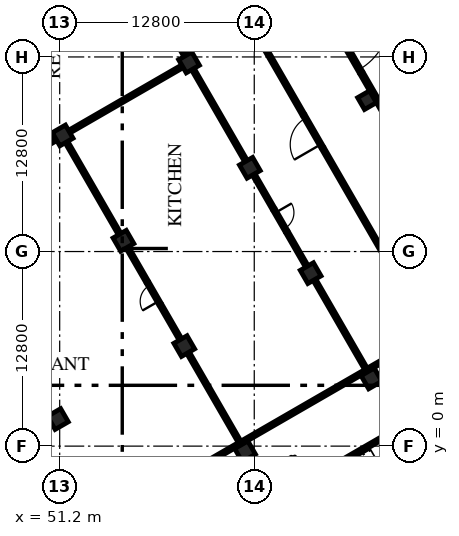
"""IFC4 building model, lengths in metres.
Left out: names, types, materials, properties, quantities, classifications, styles, units other than length and angle.
Written with IfcOpenShell. Run it as: python <this file> out.ifc"""

import sys

from ifc_helpers import new_model, si_unit, direction, frame, frame_2d, origin, origin_2d, place, context, subcontext, project, spatial, rectangle, extrude, element, fill, save


model = new_model("IFC4")
c1 = context("Model", 3, precision=1e-05, world=origin(), true_north=direction((0.0, 1.0)))
c2 = subcontext(c1, "Body", "Model", "MODEL_VIEW")
j1 = project(units=[si_unit("LENGTHUNIT", "METRE"), si_unit("PLANEANGLEUNIT", "RADIAN")], contexts=[c1])
p1 = place(None, origin())
s1 = spatial("IfcSite", under=j1, at=p1, CompositionType="ELEMENT")
p2 = place(p1, origin())
s2 = spatial("IfcBuilding", under=s1, at=p2, CompositionType="ELEMENT")
p3 = place(p2, origin())
s3 = spatial("IfcBuildingStorey", under=s2, at=p3, CompositionType="ELEMENT", Elevation=0.0)
for number, where, z_axis, x_axis in (
    (1, (63.396, -0.349, -0.3), (0.0, 0.0, 1.0), (-0.5, 0.866, 0.0)),
    (2, (71.71, 4.451, -0.3), (0.0, 0.0, 1.0), (-0.5, 0.866, 0.0)),
    (3, (51.082, 1.779, -0.3), (0.0, 0.0, 1.0), (-0.5, 0.866, 0.0)),
    (4, (59.396, 6.579, -0.3), (0.0, 0.0, 1.0), (-0.5, 0.866, 0.0)),
    (5, (67.71, 11.379, -0.3), (0.0, 0.0, 1.0), (-0.5, 0.866, 0.0)),
    (6, (55.396, 13.508, -0.3), (0.0, 0.0, 1.0), (-0.5, 0.866, 0.0)),
    (7, (63.71, 18.308, -0.3), (0.0, 0.0, 1.0), (-0.5, 0.866, 0.0)),
):
    element("IfcColumn", number, at=place(p3, frame(where, z_axis=z_axis, x_axis=x_axis)), inside=s3, PredefinedType="COLUMN", context=c2, shape_type="SweptSolid", body=[
        extrude(rectangle(XDim=1.0, YDim=1.0, at=origin_2d()), origin(), (0.0, 0.0, 1.0), 6.3),
    ])
p4 = place(p3, frame((71.417, 22.758, -0.3), z_axis=(0.0, 0.0, 1.0), x_axis=(-0.5, 0.866025403784, 0.0)))
e8 = element("IfcColumn", 8, at=p4, inside=s3, PredefinedType="COLUMN", context=c2, shape_type="SweptSolid", body=[
    extrude(rectangle(XDim=0.9, YDim=0.9, at=origin_2d()), origin(), (0.0, 0.0, 1.0), 6.3),
])
for number, where, z_axis, x_axis in (
    (9, (51.396, 20.436, -0.3), (0.0, 0.0, 1.0), (-0.5, 0.866, 0.0)),
    (10, (59.71, 25.236, -0.3), (0.0, 0.0, 1.0), (-0.5, 0.866, 0.0)),
):
    element("IfcColumn", number, at=place(p3, frame(where, z_axis=z_axis, x_axis=x_axis)), inside=s3, PredefinedType="COLUMN", context=c2, shape_type="SweptSolid", body=[
        extrude(rectangle(XDim=1.0, YDim=1.0, at=origin_2d()), origin(), (0.0, 0.0, 1.0), 6.3),
    ])
p5 = place(p3, frame((71.04, 24.561, 0.0), z_axis=(0.0, 0.0, 1.0), x_axis=(0.499980071345, -0.866036909293, 0.0)))
e11 = element("IfcWall", 11, at=p5, inside=s3, PredefinedType="SOLIDWALL", context=c2, shape_type="SweptSolid", body=[
    extrude(rectangle(XDim=3.5, YDim=0.25, at=frame_2d((1.75, 0.0))), origin(), (0.0, 0.0, 1.0), 5.7),
])
p6 = place(p3, frame((68.79, 28.458, 0.0), z_axis=(0.0, 0.0, 1.0), x_axis=(0.500013631625, -0.866017533419, 0.0)))
e12 = element("IfcWall", 12, at=p6, inside=s3, PredefinedType="SOLIDWALL", context=c2, shape_type="SweptSolid", body=[
    extrude(rectangle(XDim=4.5, YDim=0.25, at=frame_2d((2.25, 0.0))), origin(), (0.0, 0.0, 1.0), 5.7),
])
p7 = place(p6, frame((0.25, 0.0, 0.0)))
e13 = element("IfcOpeningElement", 13, at=p7, cuts=e12, PredefinedType="OPENING", context=c2, shape_type="SweptSolid", body=[
    extrude(rectangle(XDim=4.0, YDim=4.0, at=frame_2d((2.0, 2.0))), frame((0.0, 0.135, 0.0), z_axis=(0.0, -1.0, 0.0), x_axis=(1.0, 0.0, 0.0)), (0.0, 0.0, 1.0), 0.27),
])
p8 = place(p3, frame((67.349, -2.396, 0.0), z_axis=(0.0, 0.0, 1.0), x_axis=(0.86601134256, 0.500024353964, 0.0)))
e14 = element("IfcWall", 14, at=p8, inside=s3, PredefinedType="SOLIDWALL", context=c2, shape_type="SweptSolid", body=[
    extrude(rectangle(XDim=6.65, YDim=0.2, at=frame_2d((3.325, 0.0))), origin(), (0.0, 0.0, 1.0), 5.7),
])
p9 = place(p3, frame((63.083, 0.192, 0.0), z_axis=(0.0, 0.0, 1.0), x_axis=(-0.499988857673, 0.866031836714, 0.0)))
e15 = element("IfcWall", 15, at=p9, inside=s3, PredefinedType="PARTITIONING", context=c2, shape_type="SweptSolid", body=[
    extrude(rectangle(XDim=6.875, YDim=0.2, at=frame_2d((3.438, 0.0))), origin(), (0.0, 0.0, 1.0), 5.1),
])
p10 = place(p3, frame((59.146, 7.012, 0.0), z_axis=(0.0, 0.0, 1.0), x_axis=(-0.499993606316, 0.866029095148, 0.0)))
e16 = element("IfcWall", 16, at=p10, inside=s3, PredefinedType="PARTITIONING", context=c2, shape_type="SweptSolid", body=[
    extrude(rectangle(XDim=2.65, YDim=0.2, at=frame_2d((1.325, 0.0))), origin(), (0.0, 0.0, 1.0), 5.1),
])
p11 = place(p3, frame((57.821, 9.307, 0.0), z_axis=(0.0, 0.0, 1.0), x_axis=(-0.500062241894, 0.865989465428, 0.0)))
e17 = element("IfcWall", 17, at=p11, inside=s3, PredefinedType="PARTITIONING", context=c2, shape_type="SweptSolid", body=[
    extrude(rectangle(XDim=1.7, YDim=0.2, at=frame_2d((0.85, 0.0))), origin(), (0.0, 0.0, 1.0), 5.1),
])
p12 = place(p11, frame((0.25, 0.0, 0.0)))
e18 = element("IfcOpeningElement", 18, at=p12, cuts=e17, PredefinedType="OPENING", context=c2, shape_type="SweptSolid", body=[
    extrude(rectangle(XDim=1.2, YDim=2.1, at=frame_2d((0.6, 1.05))), frame((0.0, 0.11, 0.0), z_axis=(0.0, -1.0, 0.0), x_axis=(1.0, 0.0, 0.0)), (0.0, 0.0, 1.0), 0.22),
])
p13 = place(p3, frame((56.971, 10.78, 0.0), z_axis=(0.0, 0.0, 1.0), x_axis=(-0.499953715521, 0.866052124492, 0.0)))
e19 = element("IfcWall", 19, at=p13, inside=s3, PredefinedType="PARTITIONING", context=c2, shape_type="SweptSolid", body=[
    extrude(rectangle(XDim=2.65, YDim=0.2, at=frame_2d((1.325, 0.0))), origin(), (0.0, 0.0, 1.0), 5.1),
])
p14 = place(p3, frame((55.146, 13.941, 0.0), z_axis=(0.0, 0.0, 1.0), x_axis=(-0.500010275428, 0.866019471182, 0.0)))
e20 = element("IfcWall", 20, at=p14, inside=s3, PredefinedType="PARTITIONING", context=c2, shape_type="SweptSolid", body=[
    extrude(rectangle(XDim=7.0, YDim=0.2, at=frame_2d((3.5, 0.0))), origin(), (0.0, 0.0, 1.0), 5.1),
])
p15 = place(p3, frame((71.397, 4.992, 0.0), z_axis=(0.0, 0.0, 1.0), x_axis=(-0.500004234368, 0.866022959057, 0.0)))
e21 = element("IfcWall", 21, at=p15, inside=s3, PredefinedType="PARTITIONING", context=c2, shape_type="SweptSolid", body=[
    extrude(rectangle(XDim=6.875, YDim=0.2, at=frame_2d((3.438, 0.0))), origin(), (0.0, 0.0, 1.0), 5.1),
])
p16 = place(p3, frame((67.46, 11.812, 0.0), z_axis=(0.0, 0.0, 1.0), x_axis=(-0.499993606316, 0.866029095148, 0.0)))
e22 = element("IfcWall", 22, at=p16, inside=s3, PredefinedType="PARTITIONING", context=c2, shape_type="SweptSolid", body=[
    extrude(rectangle(XDim=2.65, YDim=0.2, at=frame_2d((1.325, 0.0))), origin(), (0.0, 0.0, 1.0), 5.1),
])
p17 = place(p3, frame((65.285, 15.58, 0.0), z_axis=(0.0, 0.0, 1.0), x_axis=(0.500062241894, -0.865989465428, 0.0)))
e23 = element("IfcWall", 23, at=p17, inside=s3, PredefinedType="PARTITIONING", context=c2, shape_type="SweptSolid", body=[
    extrude(rectangle(XDim=1.7, YDim=0.2, at=frame_2d((0.85, 0.0))), origin(), (0.0, 0.0, 1.0), 5.1),
])
p18 = place(p17, frame((0.25, 0.0, 0.0)))
e24 = element("IfcOpeningElement", 24, at=p18, cuts=e23, PredefinedType="OPENING", context=c2, shape_type="SweptSolid", body=[
    extrude(rectangle(XDim=1.2, YDim=2.1, at=frame_2d((0.6, 1.05))), frame((0.0, 0.11, 0.0), z_axis=(0.0, -1.0, 0.0), x_axis=(1.0, 0.0, 0.0)), (0.0, 0.0, 1.0), 0.22),
])
p19 = place(p3, frame((65.285, 15.58, 0.0), z_axis=(0.0, 0.0, 1.0), x_axis=(-0.499993606316, 0.866029095148, 0.0)))
e25 = element("IfcWall", 25, at=p19, inside=s3, PredefinedType="PARTITIONING", context=c2, shape_type="SweptSolid", body=[
    extrude(rectangle(XDim=2.65, YDim=0.2, at=frame_2d((1.325, 0.0))), origin(), (0.0, 0.0, 1.0), 5.1),
])
for number, where, z_axis, x_axis in (
    (26, (63.46, 18.74, 0.0), (0.0, 0.0, 1.0), (-0.5, 0.866, 0.0)),
    (27, (59.46, 25.669, 0.0), (0.0, 0.0, 1.0), (-0.5, 0.866, 0.0)),
):
    element("IfcWall", number, at=place(p3, frame(where, z_axis=z_axis, x_axis=x_axis)), inside=s3, PredefinedType="PARTITIONING", context=c2, shape_type="SweptSolid", body=[
        extrude(rectangle(XDim=7.0, YDim=0.2, at=frame_2d((3.5, 0.0))), origin(), (0.0, 0.0, 1.0), 5.1),
    ])
p20 = place(p3, frame((75.554, 7.393, 0.0), z_axis=(0.0, 0.0, 1.0), x_axis=(-0.500005731256, 0.866022094817, 0.0)))
e28 = element("IfcWall", 28, at=p20, inside=s3, PredefinedType="PARTITIONING", context=c2, shape_type="SweptSolid", body=[
    extrude(rectangle(XDim=14.125, YDim=0.2, at=frame_2d((7.062, 0.0))), origin(), (0.0, 0.0, 1.0), 5.1),
])
p21 = place(p3, frame((68.492, 19.625, 0.0), z_axis=(0.0, 0.0, 1.0), x_axis=(-0.500004234368, 0.866022959057, 0.0)))
e29 = element("IfcWall", 29, at=p21, inside=s3, PredefinedType="PARTITIONING", context=c2, shape_type="SweptSolid", body=[
    extrude(rectangle(XDim=2.5, YDim=0.2, at=frame_2d((1.25, 0.0))), origin(), (0.0, 0.0, 1.0), 5.1),
])
p22 = place(p21, frame((0.25, 0.0, 0.0)))
e30 = element("IfcOpeningElement", 30, at=p22, cuts=e29, PredefinedType="OPENING", context=c2, shape_type="SweptSolid", body=[
    extrude(rectangle(XDim=2.0, YDim=2.1, at=frame_2d((1.0, 1.05))), frame((0.0, 0.11, 0.0), z_axis=(0.0, -1.0, 0.0), x_axis=(1.0, 0.0, 0.0)), (0.0, 0.0, 1.0), 0.22),
])
p23 = place(p3, frame((67.242, 21.79, 0.0), z_axis=(0.0, 0.0, 1.0), x_axis=(-0.500004551153, 0.866022776159, 0.0)))
e31 = element("IfcWall", 31, at=p23, inside=s3, PredefinedType="PARTITIONING", context=c2, shape_type="SweptSolid", body=[
    extrude(rectangle(XDim=21.9, YDim=0.2, at=frame_2d((10.95, 0.0))), origin(), (0.0, 0.0, 1.0), 5.1),
])
p24 = place(p3, frame((46.542, -9.357, 0.0), z_axis=(0.0, 0.0, 1.0), x_axis=(0.866023601547, 0.500003121554, 0.0)))
e32 = element("IfcWall", 32, at=p24, inside=s3, PredefinedType="PARTITIONING", context=c2, shape_type="SweptSolid", body=[
    extrude(rectangle(XDim=19.0, YDim=0.2, at=frame_2d((9.5, 0.0))), origin(), (0.0, 0.0, 1.0), 5.1),
])
p25 = place(p3, frame((63.17, 0.242, 0.0), z_axis=(0.0, 0.0, 1.0), x_axis=(0.866027286158, 0.499996739618, 0.0)))
e33 = element("IfcWall", 33, at=p25, inside=s3, PredefinedType="PARTITIONING", context=c2, shape_type="SweptSolid", body=[
    extrude(rectangle(XDim=9.4, YDim=0.2, at=frame_2d((4.7, 0.0))), origin(), (0.0, 0.0, 1.0), 5.1),
])
p26 = place(p3, frame((47.325, 18.086, 0.0), z_axis=(0.0, 0.0, 1.0), x_axis=(0.866023935413, 0.500002543286, 0.0)))
e34 = element("IfcWall", 34, at=p26, inside=s3, PredefinedType="PARTITIONING", context=c2, shape_type="SweptSolid", body=[
    extrude(rectangle(XDim=4.2, YDim=0.2, at=frame_2d((2.1, 0.0))), origin(), (0.0, 0.0, 1.0), 5.1),
])
p27 = place(p3, frame((51.829, 20.686, 0.0), z_axis=(0.0, 0.0, 1.0), x_axis=(0.866021068297, 0.500007509209, 0.0)))
e35 = element("IfcWall", 35, at=p27, inside=s3, PredefinedType="PARTITIONING", context=c2, shape_type="SweptSolid", body=[
    extrude(rectangle(XDim=8.6, YDim=0.2, at=frame_2d((4.3, 0.0))), origin(), (0.0, 0.0, 1.0), 5.1),
])
p28 = place(p3, frame((75.468, 7.343, 0.0), z_axis=(0.0, 0.0, 1.0), x_axis=(-0.866016770315, -0.500014953309, 0.0)))
e36 = element("IfcWall", 36, at=p28, inside=s3, PredefinedType="PARTITIONING", context=c2, shape_type="SweptSolid", body=[
    extrude(rectangle(XDim=4.6, YDim=0.2, at=frame_2d((2.3, 0.0))), origin(), (0.0, 0.0, 1.0), 5.1),
])
p29 = place(p28, frame((1.4, 0.0, 0.0)))
e37 = element("IfcOpeningElement", 37, at=p29, cuts=e36, PredefinedType="OPENING", context=c2, shape_type="SweptSolid", body=[
    extrude(rectangle(XDim=1.8, YDim=2.1, at=frame_2d((0.9, 1.05))), frame((0.0, 0.11, 0.0), z_axis=(0.0, -1.0, 0.0), x_axis=(1.0, 0.0, 0.0)), (0.0, 0.0, 1.0), 0.22),
])
p30 = place(p7, origin())
e38 = element("IfcDoor", 38, at=p30, inside=s3, OperationType="ROLLINGUP", PredefinedType="DOOR", context=c2, shape_type="SweptSolid", body=[
    extrude(rectangle(XDim=4.0, YDim=4.0, at=frame_2d((2.0, 2.0))), frame((0.0, 0.025, 0.0), z_axis=(0.0, -1.0, 0.0), x_axis=(1.0, 0.0, 0.0)), (0.0, 0.0, 1.0), 0.05),
])
fill(e13, e38)
p31 = place(p12, origin())
e39 = element("IfcDoor", 39, at=p31, inside=s3, OperationType="SINGLE_SWING_LEFT", PredefinedType="DOOR", context=c2, shape_type="SweptSolid", body=[
    extrude(rectangle(XDim=1.2, YDim=2.1, at=frame_2d((0.6, 1.05))), frame((0.0, 0.025, 0.0), z_axis=(0.0, -1.0, 0.0), x_axis=(1.0, 0.0, 0.0)), (0.0, 0.0, 1.0), 0.05),
])
fill(e18, e39)
p32 = place(p18, origin())
e40 = element("IfcDoor", 40, at=p32, inside=s3, OperationType="SINGLE_SWING_LEFT", PredefinedType="DOOR", context=c2, shape_type="SweptSolid", body=[
    extrude(rectangle(XDim=1.2, YDim=2.1, at=frame_2d((0.6, 1.05))), frame((0.0, 0.025, 0.0), z_axis=(0.0, -1.0, 0.0), x_axis=(1.0, 0.0, 0.0)), (0.0, 0.0, 1.0), 0.05),
])
fill(e24, e40)
p33 = place(p22, origin())
e41 = element("IfcDoor", 41, at=p33, inside=s3, OperationType="DOUBLE_DOOR_SINGLE_SWING", PredefinedType="DOOR", context=c2, shape_type="SweptSolid", body=[
    extrude(rectangle(XDim=2.0, YDim=2.1, at=frame_2d((1.0, 1.05))), frame((0.0, 0.025, 0.0), z_axis=(0.0, -1.0, 0.0), x_axis=(1.0, 0.0, 0.0)), (0.0, 0.0, 1.0), 0.05),
])
fill(e30, e41)
save(model, sys.argv[1])
